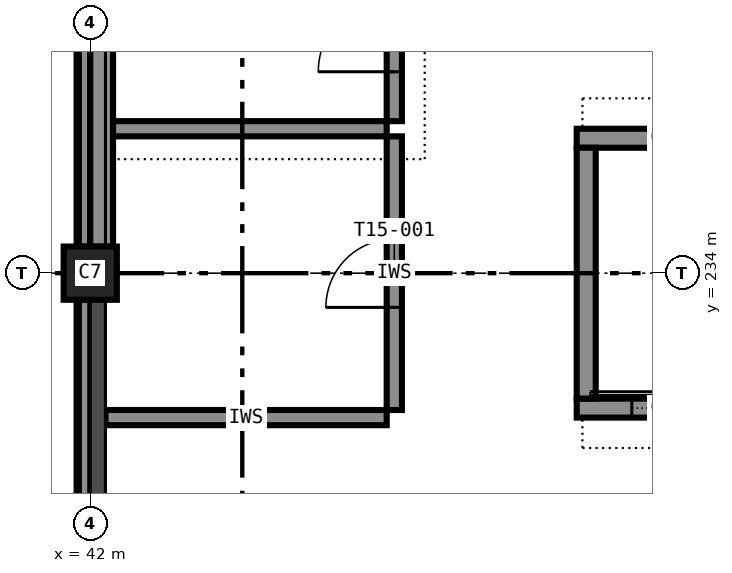
"""IFC4 building model, lengths in metres.
Left out: names, types, materials, properties, quantities, classifications, styles, units other than length and angle.
Written with IfcOpenShell. Run it as: python <this file> out.ifc"""

import sys

from ifc_helpers import new_model, si_unit, direction, frame, frame_2d, origin, origin_2d, place, context, subcontext, project, spatial, rectangle, extrude, element, fill, save


model = new_model("IFC4")
c1 = context("Model", 3, precision=1e-05, world=origin(), true_north=direction((0.0, 1.0)))
c2 = subcontext(c1, "Body", "Model", "MODEL_VIEW")
j1 = project(units=[si_unit("LENGTHUNIT", "METRE"), si_unit("PLANEANGLEUNIT", "RADIAN")], contexts=[c1])
p1 = place(None, origin())
s1 = spatial("IfcSite", under=j1, at=p1, CompositionType="ELEMENT")
p2 = place(p1, origin())
s2 = spatial("IfcBuilding", under=s1, at=p2, CompositionType="ELEMENT")
p3 = place(p2, frame((0.0, 0.0, 60.6)))
s3 = spatial("IfcBuildingStorey", under=s2, at=p3, CompositionType="ELEMENT", Elevation=60.6)
p4 = place(p3, frame((42.0, 234.0, 0.0), z_axis=(0.0, 0.0, 1.0), x_axis=(1.0, 0.0, 0.0)))
e1 = element("IfcColumn", 1, at=p4, inside=s3, PredefinedType="COLUMN", context=c2, shape_type="SweptSolid", body=[
    extrude(rectangle(XDim=0.7, YDim=0.7, at=origin_2d()), origin(), (0.0, 0.0, 1.0), 3.6),
])
p5 = place(p3, frame((48.4, 232.225, 0.0), z_axis=(0.0, 0.0, 1.0), x_axis=(1.0, 0.0, 0.0)))
e2 = element("IfcWall", 2, at=p5, inside=s3, PredefinedType="SHEAR", context=c2, shape_type="SweptSolid", body=[
    extrude(rectangle(XDim=2.55, YDim=0.25, at=frame_2d((1.275, 0.0))), origin(), (0.0, 0.0, 1.0), 3.6),
])
p6 = place(p5, frame((0.725, 0.0, 0.0)))
e3 = element("IfcOpeningElement", 3, at=p6, cuts=e2, PredefinedType="OPENING", context=c2, shape_type="SweptSolid", body=[
    extrude(rectangle(XDim=1.1, YDim=2.1, at=frame_2d((0.55, 1.05))), frame((0.0, 0.135, 0.0), z_axis=(0.0, -1.0, 0.0), x_axis=(1.0, 0.0, 0.0)), (0.0, 0.0, 1.0), 0.27),
])
p7 = place(p3, frame((48.4, 235.775, 0.0), z_axis=(0.0, 0.0, 1.0), x_axis=(1.0, 0.0, 0.0)))
e4 = element("IfcWall", 4, at=p7, inside=s3, PredefinedType="SHEAR", context=c2, shape_type="SweptSolid", body=[
    extrude(rectangle(XDim=2.55, YDim=0.25, at=frame_2d((1.275, 0.0))), origin(), (0.0, 0.0, 1.0), 3.6),
])
p8 = place(p3, frame((48.525, 232.35, 0.0), z_axis=(0.0, 0.0, 1.0), x_axis=(0.0, 1.0, 0.0)))
e5 = element("IfcWall", 5, at=p8, inside=s3, PredefinedType="SHEAR", context=c2, shape_type="SweptSolid", body=[
    extrude(rectangle(XDim=3.3, YDim=0.25, at=frame_2d((1.65, 0.0))), origin(), (0.0, 0.0, 1.0), 3.6),
])
p9 = place(p3, frame((42.15, 245.65, 0.0), z_axis=(0.0, 0.0, 1.0), x_axis=(0.0, -1.0, 0.0)))
e6 = element("IfcWall", 6, at=p9, inside=s3, PredefinedType="STANDARD", context=c2, shape_type="SweptSolid", body=[
    extrude(rectangle(XDim=11.3, YDim=0.3, at=frame_2d((5.65, 0.0))), origin(), (0.0, 0.0, 1.0), 2.6),
])
for number, where, z_axis, x_axis in (
    (7, (41.925, 245.65, 3.4), (0.0, 0.0, 1.0), (0.0, -1.0, 0.0)),
    (8, (41.925, 233.65, 3.4), (0.0, 0.0, 1.0), (0.0, -1.0, 0.0)),
):
    element("IfcWall", number, at=place(p3, frame(where, z_axis=z_axis, x_axis=x_axis)), inside=s3, PredefinedType="STANDARD", context=c2, shape_type="SweptSolid", body=[
        extrude(rectangle(XDim=11.3, YDim=0.15, at=frame_2d((5.65, 0.0))), origin(), (0.0, 0.0, 1.0), 0.2),
    ])
p10 = place(p3, frame((42.2, 232.1, 0.0), z_axis=(0.0, 0.0, 1.0), x_axis=(1.0, 0.0, 0.0)))
e9 = element("IfcWall", 9, at=p10, inside=s3, PredefinedType="PARTITIONING", context=c2, shape_type="SweptSolid", body=[
    extrude(rectangle(XDim=3.7, YDim=0.2, at=frame_2d((1.85, 0.0))), origin(), (0.0, 0.0, 1.0), 3.4),
])
p11 = place(p3, frame((42.3, 235.9, 0.0), z_axis=(0.0, 0.0, 1.0), x_axis=(1.0, 0.0, 0.0)))
e10 = element("IfcWall", 10, at=p11, inside=s3, PredefinedType="PARTITIONING", context=c2, shape_type="SweptSolid", body=[
    extrude(rectangle(XDim=3.6, YDim=0.2, at=frame_2d((1.8, 0.0))), origin(), (0.0, 0.0, 1.0), 3.4),
])
p12 = place(p3, frame((46.0, 232.2, 0.0), z_axis=(0.0, 0.0, 1.0), x_axis=(0.0, 1.0, 0.0)))
e11 = element("IfcWall", 11, at=p12, inside=s3, PredefinedType="PARTITIONING", context=c2, shape_type="SweptSolid", body=[
    extrude(rectangle(XDim=3.6, YDim=0.2, at=frame_2d((1.8, 0.0))), origin(), (0.0, 0.0, 1.0), 3.4),
])
p13 = place(p12, frame((1.35, 0.0, 0.0)))
e12 = element("IfcOpeningElement", 12, at=p13, cuts=e11, PredefinedType="OPENING", context=c2, shape_type="SweptSolid", body=[
    extrude(rectangle(XDim=0.9, YDim=2.1, at=frame_2d((0.45, 1.05))), frame((0.0, 0.11, 0.0), z_axis=(0.0, -1.0, 0.0), x_axis=(1.0, 0.0, 0.0)), (0.0, 0.0, 1.0), 0.22),
])
p14 = place(p3, frame((46.0, 236.0, 0.0), z_axis=(0.0, 0.0, 1.0), x_axis=(0.0, 1.0, 0.0)))
e13 = element("IfcWall", 13, at=p14, inside=s3, PredefinedType="PARTITIONING", context=c2, shape_type="SweptSolid", body=[
    extrude(rectangle(XDim=2.3, YDim=0.2, at=frame_2d((1.15, 0.0))), origin(), (0.0, 0.0, 1.0), 3.4),
])
p15 = place(p14, frame((0.65, 0.0, 0.0)))
e14 = element("IfcOpeningElement", 14, at=p15, cuts=e13, PredefinedType="OPENING", context=c2, shape_type="SweptSolid", body=[
    extrude(rectangle(XDim=1.0, YDim=2.1, at=frame_2d((0.5, 1.05))), frame((0.0, 0.11, 0.0), z_axis=(0.0, -1.0, 0.0), x_axis=(1.0, 0.0, 0.0)), (0.0, 0.0, 1.0), 0.22),
])
p16 = place(p13, origin())
e15 = element("IfcDoor", 15, at=p16, inside=s3, OperationType="SINGLE_SWING_LEFT", PredefinedType="DOOR", context=c2, shape_type="SweptSolid", body=[
    extrude(rectangle(XDim=0.9, YDim=2.1, at=frame_2d((0.45, 1.05))), frame((0.0, 0.025, 0.0), z_axis=(0.0, -1.0, 0.0), x_axis=(1.0, 0.0, 0.0)), (0.0, 0.0, 1.0), 0.05),
])
fill(e12, e15)
p17 = place(p15, origin())
e16 = element("IfcDoor", 16, at=p17, inside=s3, OperationType="SINGLE_SWING_LEFT", PredefinedType="DOOR", context=c2, shape_type="SweptSolid", body=[
    extrude(rectangle(XDim=1.0, YDim=2.1, at=frame_2d((0.5, 1.05))), frame((0.0, 0.025, 0.0), z_axis=(0.0, -1.0, 0.0), x_axis=(1.0, 0.0, 0.0)), (0.0, 0.0, 1.0), 0.05),
])
fill(e14, e16)
p18 = place(p6, origin())
e17 = element("IfcDoor", 17, at=p18, inside=s3, OperationType="SLIDING_TO_LEFT", PredefinedType="DOOR", context=c2, shape_type="SweptSolid", body=[
    extrude(rectangle(XDim=1.1, YDim=2.1, at=frame_2d((0.55, 1.05))), frame((0.0, 0.025, 0.0), z_axis=(0.0, -1.0, 0.0), x_axis=(1.0, 0.0, 0.0)), (0.0, 0.0, 1.0), 0.05),
])
fill(e3, e17)
save(model, sys.argv[1])
